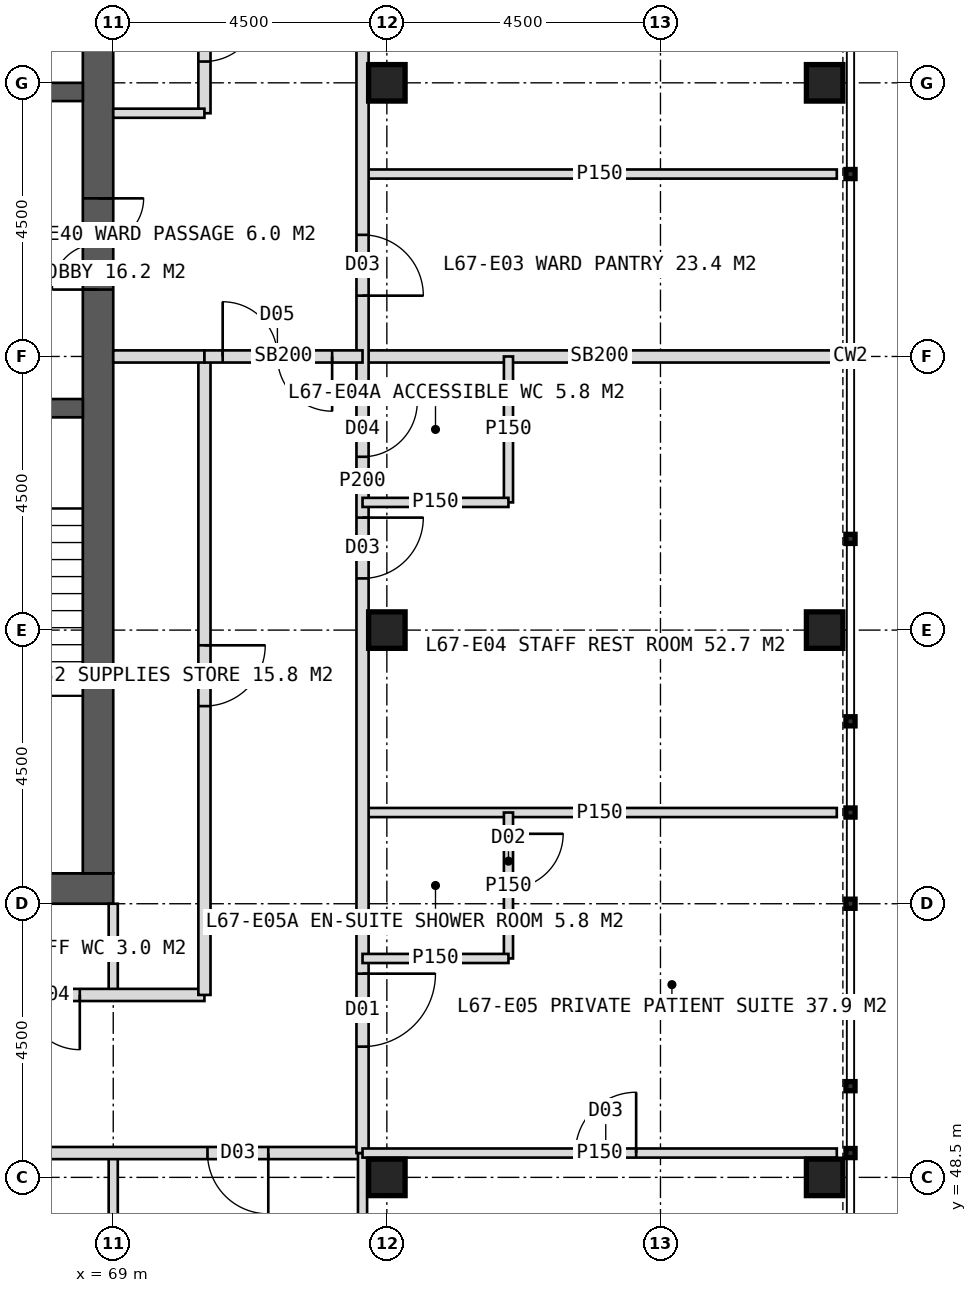
"""IFC4 building model, lengths in metres.
Left out: names, types, materials, properties, quantities, classifications, styles, units other than length and angle.
Written with IfcOpenShell. Run it as: python <this file> out.ifc"""

import sys

from ifc_helpers import new_model, si_unit, direction, frame, frame_2d, origin, origin_2d, place, context, subcontext, project, spatial, rectangle, hollow_rectangle, extrude, element, fill, save


model = new_model("IFC4")
c1 = context("Model", 3, precision=1e-05, world=origin(), true_north=direction((0.0, 1.0)))
c2 = subcontext(c1, "Body", "Model", "MODEL_VIEW")
j1 = project(units=[si_unit("LENGTHUNIT", "METRE"), si_unit("PLANEANGLEUNIT", "RADIAN")], contexts=[c1])
p1 = place(None, origin())
s1 = spatial("IfcSite", under=j1, at=p1, CompositionType="ELEMENT")
p2 = place(p1, origin())
s2 = spatial("IfcBuilding", under=s1, at=p2, CompositionType="ELEMENT")
p3 = place(p2, frame((0.0, 0.0, 278.0)))
s3 = spatial("IfcBuildingStorey", under=s2, at=p3, CompositionType="ELEMENT", Elevation=278.0)
p4 = place(p3, frame((51.0, 53.25, 0.0), z_axis=(0.0, 0.0, 1.0), x_axis=(1.0, 0.0, 0.0)))
e1 = element("IfcWall", 1, at=p4, inside=s3, PredefinedType="SHEAR", context=c2, shape_type="SweptSolid", body=[
    extrude(rectangle(XDim=18.0, YDim=0.5, at=frame_2d((9.0, 0.0))), origin(), (0.0, 0.0, 1.0), 4.0),
])
p5 = place(p4, frame((8.1, 0.0, 0.0)))
e2 = element("IfcOpeningElement", 2, at=p5, cuts=e1, PredefinedType="OPENING", context=c2, shape_type="SweptSolid", body=[
    extrude(rectangle(XDim=1.8, YDim=2.2, at=frame_2d((0.9, 1.1))), frame((0.0, 0.26, 0.0), z_axis=(0.0, -1.0, 0.0), x_axis=(1.0, 0.0, 0.0)), (0.0, 0.0, 1.0), 0.52),
])
p6 = place(p3, frame((68.75, 53.5, 0.0), z_axis=(0.0, 0.0, 1.0), x_axis=(0.0, 1.0, 0.0)))
e3 = element("IfcWall", 3, at=p6, inside=s3, PredefinedType="SHEAR", context=c2, shape_type="SweptSolid", body=[
    extrude(rectangle(XDim=17.0, YDim=0.5, at=frame_2d((8.5, 0.0))), origin(), (0.0, 0.0, 1.0), 4.0),
])
p7 = place(p6, frame((9.6, 0.0, 0.0)))
e4 = element("IfcOpeningElement", 4, at=p7, cuts=e3, PredefinedType="OPENING", context=c2, shape_type="SweptSolid", body=[
    extrude(rectangle(XDim=1.5, YDim=2.2, at=frame_2d((0.75, 1.1))), frame((0.0, 0.26, 0.0), z_axis=(0.0, -1.0, 0.0), x_axis=(1.0, 0.0, 0.0)), (0.0, 0.0, 1.0), 0.52),
])
p8 = place(p3, frame((65.2, 61.15, 0.0), z_axis=(0.0, 0.0, 1.0), x_axis=(1.0, 0.0, 0.0)))
e5 = element("IfcWall", 5, at=p8, inside=s3, PredefinedType="SHEAR", context=c2, shape_type="SweptSolid", body=[
    extrude(rectangle(XDim=3.3, YDim=0.3, at=frame_2d((1.65, 0.0))), origin(), (0.0, 0.0, 1.0), 4.0),
])
p9 = place(p8, frame((1.05, 0.0, 0.0)))
e6 = element("IfcOpeningElement", 6, at=p9, cuts=e5, PredefinedType="OPENING", context=c2, shape_type="SweptSolid", body=[
    extrude(rectangle(XDim=1.2, YDim=2.1, at=frame_2d((0.6, 1.05))), frame((0.0, 0.16, 0.0), z_axis=(0.0, -1.0, 0.0), x_axis=(1.0, 0.0, 0.0)), (0.0, 0.0, 1.0), 0.32),
])
p10 = place(p3, frame((65.2, 66.35, 0.0), z_axis=(0.0, 0.0, 1.0), x_axis=(1.0, 0.0, 0.0)))
e7 = element("IfcWall", 7, at=p10, inside=s3, PredefinedType="SHEAR", context=c2, shape_type="SweptSolid", body=[
    extrude(rectangle(XDim=3.3, YDim=0.3, at=frame_2d((1.65, 0.0))), origin(), (0.0, 0.0, 1.0), 4.0),
])
p11 = place(p10, frame((1.05, 0.0, 0.0)))
e8 = element("IfcOpeningElement", 8, at=p11, cuts=e7, PredefinedType="OPENING", context=c2, shape_type="SweptSolid", body=[
    extrude(rectangle(XDim=1.2, YDim=2.2, at=frame_2d((0.6, 1.1))), frame((0.0, 0.16, 0.0), z_axis=(0.0, -1.0, 0.0), x_axis=(1.0, 0.0, 0.0)), (0.0, 0.0, 1.0), 0.32),
])
for number, where, z_axis, x_axis in (
    (9, (73.5, 48.5, 0.0), (0.0, 0.0, 1.0), (1.0, 0.0, 0.0)),
    (10, (73.5, 57.5, 0.0), (0.0, 0.0, 1.0), (1.0, 0.0, 0.0)),
    (11, (73.5, 66.5, 0.0), (0.0, 0.0, 1.0), (1.0, 0.0, 0.0)),
    (12, (80.7, 48.5, 0.0), (0.0, 0.0, 1.0), (1.0, 0.0, 0.0)),
    (13, (80.7, 57.5, 0.0), (0.0, 0.0, 1.0), (1.0, 0.0, 0.0)),
    (14, (80.7, 66.5, 0.0), (0.0, 0.0, 1.0), (1.0, 0.0, 0.0)),
):
    element("IfcColumn", number, at=place(p3, frame(where, z_axis=z_axis, x_axis=x_axis)), inside=s3, PredefinedType="COLUMN", context=c2, shape_type="SweptSolid", body=[
        extrude(hollow_rectangle(XDim=0.6, YDim=0.6, WallThickness=0.04, at=origin_2d()), origin(), (0.0, 0.0, 1.0), 4.0),
    ])
p12 = place(p3, frame((69.0, 48.9, 0.0), z_axis=(0.0, 0.0, 1.0), x_axis=(0.0, -1.0, 0.0)))
e15 = element("IfcWall", 15, at=p12, inside=s3, PredefinedType="PARTITIONING", context=c2, shape_type="SweptSolid", body=[
    extrude(rectangle(XDim=7.8, YDim=0.15, at=frame_2d((3.9, 0.0))), origin(), (0.0, 0.0, 1.0), 3.75),
])
p13 = place(p3, frame((73.1, 48.9, 0.0), z_axis=(0.0, 0.0, 1.0), x_axis=(-1.0, 0.0, 0.0)))
e16 = element("IfcWall", 16, at=p13, inside=s3, PredefinedType="PARTITIONING", context=c2, shape_type="SweptSolid", body=[
    extrude(rectangle(XDim=26.2, YDim=0.2, at=frame_2d((13.1, 0.0))), origin(), (0.0, 0.0, 1.0), 3.75),
])
p14 = place(p13, frame((1.55, 0.0, 0.0)))
e17 = element("IfcOpeningElement", 17, at=p14, cuts=e16, PredefinedType="OPENING", context=c2, shape_type="SweptSolid", body=[
    extrude(rectangle(XDim=1.0, YDim=2.1, at=frame_2d((0.5, 1.05))), frame((0.0, 0.11, 0.0), z_axis=(0.0, -1.0, 0.0), x_axis=(1.0, 0.0, 0.0)), (0.0, 0.0, 1.0), 0.22),
])
p15 = place(p13, frame((6.75, 0.0, 0.0)))
e18 = element("IfcOpeningElement", 18, at=p15, cuts=e16, PredefinedType="OPENING", context=c2, shape_type="SweptSolid", body=[
    extrude(rectangle(XDim=1.0, YDim=2.1, at=frame_2d((0.5, 1.05))), frame((0.0, 0.11, 0.0), z_axis=(0.0, -1.0, 0.0), x_axis=(1.0, 0.0, 0.0)), (0.0, 0.0, 1.0), 0.22),
])
p16 = place(p13, frame((14.25, 0.0, 0.0)))
e19 = element("IfcOpeningElement", 19, at=p16, cuts=e16, PredefinedType="OPENING", context=c2, shape_type="SweptSolid", body=[
    extrude(rectangle(XDim=1.2, YDim=2.2, at=frame_2d((0.6, 1.1))), frame((0.0, 0.11, 0.0), z_axis=(0.0, -1.0, 0.0), x_axis=(1.0, 0.0, 0.0)), (0.0, 0.0, 1.0), 0.22),
])
p17 = place(p13, frame((18.45, 0.0, 0.0)))
e20 = element("IfcOpeningElement", 20, at=p17, cuts=e16, PredefinedType="OPENING", context=c2, shape_type="SweptSolid", body=[
    extrude(rectangle(XDim=1.0, YDim=2.1, at=frame_2d((0.5, 1.05))), frame((0.0, 0.11, 0.0), z_axis=(0.0, -1.0, 0.0), x_axis=(1.0, 0.0, 0.0)), (0.0, 0.0, 1.0), 0.22),
])
p18 = place(p13, frame((23.25, 0.0, 0.0)))
e21 = element("IfcOpeningElement", 21, at=p18, cuts=e16, PredefinedType="OPENING", context=c2, shape_type="SweptSolid", body=[
    extrude(rectangle(XDim=1.2, YDim=2.2, at=frame_2d((0.6, 1.1))), frame((0.0, 0.11, 0.0), z_axis=(0.0, -1.0, 0.0), x_axis=(1.0, 0.0, 0.0)), (0.0, 0.0, 1.0), 0.22),
])
p19 = place(p3, frame((73.1, 48.9, 0.0), z_axis=(0.0, 0.0, 1.0), x_axis=(0.0, -1.0, 0.0)))
e22 = element("IfcWall", 22, at=p19, inside=s3, PredefinedType="PARTITIONING", context=c2, shape_type="SweptSolid", body=[
    extrude(rectangle(XDim=7.8, YDim=0.15, at=frame_2d((3.9, 0.0))), origin(), (0.0, 0.0, 1.0), 3.75),
])
p20 = place(p3, frame((69.0, 53.0, 0.0), z_axis=(0.0, 0.0, 1.0), x_axis=(0.0, -1.0, 0.0)))
e23 = element("IfcWall", 23, at=p20, inside=s3, PredefinedType="PARTITIONING", context=c2, shape_type="SweptSolid", body=[
    extrude(rectangle(XDim=1.5, YDim=0.15, at=frame_2d((0.75, 0.0))), origin(), (0.0, 0.0, 1.0), 3.75),
])
p21 = place(p3, frame((70.5, 51.5, 0.0), z_axis=(0.0, 0.0, 1.0), x_axis=(-1.0, 0.0, 0.0)))
e24 = element("IfcWall", 24, at=p21, inside=s3, PredefinedType="PARTITIONING", context=c2, shape_type="SweptSolid", body=[
    extrude(rectangle(XDim=8.25, YDim=0.2, at=frame_2d((4.125, 0.0))), origin(), (0.0, 0.0, 1.0), 3.75),
])
p22 = place(p21, frame((2.05, 0.0, 0.0)))
e25 = element("IfcOpeningElement", 25, at=p22, cuts=e24, PredefinedType="OPENING", context=c2, shape_type="SweptSolid", body=[
    extrude(rectangle(XDim=0.9, YDim=2.1, at=frame_2d((0.45, 1.05))), frame((0.0, 0.11, 0.0), z_axis=(0.0, -1.0, 0.0), x_axis=(1.0, 0.0, 0.0)), (0.0, 0.0, 1.0), 0.22),
])
p23 = place(p21, frame((5.375, 0.0, 0.0)))
e26 = element("IfcOpeningElement", 26, at=p23, cuts=e24, PredefinedType="OPENING", context=c2, shape_type="SweptSolid", body=[
    extrude(rectangle(XDim=1.0, YDim=2.1, at=frame_2d((0.5, 1.05))), frame((0.0, 0.11, 0.0), z_axis=(0.0, -1.0, 0.0), x_axis=(1.0, 0.0, 0.0)), (0.0, 0.0, 1.0), 0.22),
])
p24 = place(p3, frame((73.1, 65.0, 0.0), z_axis=(0.0, 0.0, 1.0), x_axis=(1.0, 0.0, 0.0)))
e27 = element("IfcWall", 27, at=p24, inside=s3, PredefinedType="PARTITIONING", context=c2, shape_type="SweptSolid", body=[
    extrude(rectangle(XDim=7.8, YDim=0.15, at=frame_2d((3.9, 0.0))), origin(), (0.0, 0.0, 1.0), 3.75),
])
p25 = place(p3, frame((73.1, 62.0, 0.0), z_axis=(0.0, 0.0, 1.0), x_axis=(1.0, 0.0, 0.0)))
e28 = element("IfcWall", 28, at=p25, inside=s3, PredefinedType="SOLIDWALL", context=c2, shape_type="SweptSolid", body=[
    extrude(rectangle(XDim=7.8, YDim=0.2, at=frame_2d((3.9, 0.0))), origin(), (0.0, 0.0, 1.0), 2.75),
])
p26 = place(p3, frame((73.1, 54.5, 0.0), z_axis=(0.0, 0.0, 1.0), x_axis=(1.0, 0.0, 0.0)))
e29 = element("IfcWall", 29, at=p26, inside=s3, PredefinedType="PARTITIONING", context=c2, shape_type="SweptSolid", body=[
    extrude(rectangle(XDim=7.8, YDim=0.15, at=frame_2d((3.9, 0.0))), origin(), (0.0, 0.0, 1.0), 3.75),
])
p27 = place(p3, frame((73.1, 71.0, 0.0), z_axis=(0.0, 0.0, 1.0), x_axis=(0.0, -1.0, 0.0)))
e30 = element("IfcWall", 30, at=p27, inside=s3, PredefinedType="PARTITIONING", context=c2, shape_type="SweptSolid", body=[
    extrude(rectangle(XDim=22.1, YDim=0.2, at=frame_2d((11.05, 0.0))), origin(), (0.0, 0.0, 1.0), 3.75),
])
p28 = place(p27, frame((2.5, 0.0, 0.0)))
e31 = element("IfcOpeningElement", 31, at=p28, cuts=e30, PredefinedType="OPENING", context=c2, shape_type="SweptSolid", body=[
    extrude(rectangle(XDim=1.0, YDim=2.1, at=frame_2d((0.5, 1.05))), frame((0.0, 0.11, 0.0), z_axis=(0.0, -1.0, 0.0), x_axis=(1.0, 0.0, 0.0)), (0.0, 0.0, 1.0), 0.22),
])
p29 = place(p27, frame((7.0, 0.0, 0.0)))
e32 = element("IfcOpeningElement", 32, at=p29, cuts=e30, PredefinedType="OPENING", context=c2, shape_type="SweptSolid", body=[
    extrude(rectangle(XDim=1.0, YDim=2.1, at=frame_2d((0.5, 1.05))), frame((0.0, 0.11, 0.0), z_axis=(0.0, -1.0, 0.0), x_axis=(1.0, 0.0, 0.0)), (0.0, 0.0, 1.0), 0.22),
])
p30 = place(p27, frame((9.75, 0.0, 0.0)))
e33 = element("IfcOpeningElement", 33, at=p30, cuts=e30, PredefinedType="OPENING", context=c2, shape_type="SweptSolid", body=[
    extrude(rectangle(XDim=0.9, YDim=2.1, at=frame_2d((0.45, 1.05))), frame((0.0, 0.11, 0.0), z_axis=(0.0, -1.0, 0.0), x_axis=(1.0, 0.0, 0.0)), (0.0, 0.0, 1.0), 0.22),
])
p31 = place(p27, frame((11.65, 0.0, 0.0)))
e34 = element("IfcOpeningElement", 34, at=p31, cuts=e30, PredefinedType="OPENING", context=c2, shape_type="SweptSolid", body=[
    extrude(rectangle(XDim=1.0, YDim=2.1, at=frame_2d((0.5, 1.05))), frame((0.0, 0.11, 0.0), z_axis=(0.0, -1.0, 0.0), x_axis=(1.0, 0.0, 0.0)), (0.0, 0.0, 1.0), 0.22),
])
p32 = place(p27, frame((19.15, 0.0, 0.0)))
e35 = element("IfcOpeningElement", 35, at=p32, cuts=e30, PredefinedType="OPENING", context=c2, shape_type="SweptSolid", body=[
    extrude(rectangle(XDim=1.2, YDim=2.2, at=frame_2d((0.6, 1.1))), frame((0.0, 0.11, 0.0), z_axis=(0.0, -1.0, 0.0), x_axis=(1.0, 0.0, 0.0)), (0.0, 0.0, 1.0), 0.22),
])
for number, where, z_axis, x_axis in (
    (36, (75.5, 62.0, 0.0), (0.0, 0.0, 1.0), (0.0, -1.0, 0.0)),
    (37, (73.1, 59.6, 0.0), (0.0, 0.0, 1.0), (1.0, 0.0, 0.0)),
):
    element("IfcWall", number, at=place(p3, frame(where, z_axis=z_axis, x_axis=x_axis)), inside=s3, PredefinedType="PARTITIONING", context=c2, shape_type="SweptSolid", body=[
        extrude(rectangle(XDim=2.4, YDim=0.15, at=frame_2d((1.2, 0.0))), origin(), (0.0, 0.0, 1.0), 3.75),
    ])
p33 = place(p3, frame((73.1, 48.9, 0.0), z_axis=(0.0, 0.0, 1.0), x_axis=(1.0, 0.0, 0.0)))
e38 = element("IfcWall", 38, at=p33, inside=s3, PredefinedType="PARTITIONING", context=c2, shape_type="SweptSolid", body=[
    extrude(rectangle(XDim=7.8, YDim=0.15, at=frame_2d((3.9, 0.0))), origin(), (0.0, 0.0, 1.0), 3.75),
])
p34 = place(p33, frame((3.5, 0.0, 0.0)))
e39 = element("IfcOpeningElement", 39, at=p34, cuts=e38, PredefinedType="OPENING", context=c2, shape_type="SweptSolid", body=[
    extrude(rectangle(XDim=1.0, YDim=2.1, at=frame_2d((0.5, 1.05))), frame((0.0, 0.085, 0.0), z_axis=(0.0, -1.0, 0.0), x_axis=(1.0, 0.0, 0.0)), (0.0, 0.0, 1.0), 0.17),
])
p35 = place(p3, frame((75.5, 54.5, 0.0), z_axis=(0.0, 0.0, 1.0), x_axis=(0.0, -1.0, 0.0)))
e40 = element("IfcWall", 40, at=p35, inside=s3, PredefinedType="PARTITIONING", context=c2, shape_type="SweptSolid", body=[
    extrude(rectangle(XDim=2.4, YDim=0.15, at=frame_2d((1.2, 0.0))), origin(), (0.0, 0.0, 1.0), 3.75),
])
p36 = place(p35, frame((0.35, 0.0, 0.0)))
e41 = element("IfcOpeningElement", 41, at=p36, cuts=e40, PredefinedType="OPENING", context=c2, shape_type="SweptSolid", body=[
    extrude(rectangle(XDim=0.9, YDim=2.1, at=frame_2d((0.45, 1.05))), frame((0.0, 0.085, 0.0), z_axis=(0.0, -1.0, 0.0), x_axis=(1.0, 0.0, 0.0)), (0.0, 0.0, 1.0), 0.17),
])
p37 = place(p3, frame((73.1, 52.1, 0.0), z_axis=(0.0, 0.0, 1.0), x_axis=(1.0, 0.0, 0.0)))
e42 = element("IfcWall", 42, at=p37, inside=s3, PredefinedType="PARTITIONING", context=c2, shape_type="SweptSolid", body=[
    extrude(rectangle(XDim=2.4, YDim=0.15, at=frame_2d((1.2, 0.0))), origin(), (0.0, 0.0, 1.0), 3.75),
])
p38 = place(p3, frame((70.5, 71.0, 0.0), z_axis=(0.0, 0.0, 1.0), x_axis=(0.0, -1.0, 0.0)))
e43 = element("IfcWall", 43, at=p38, inside=s3, PredefinedType="PARTITIONING", context=c2, shape_type="SweptSolid", body=[
    extrude(rectangle(XDim=5.0, YDim=0.2, at=frame_2d((2.5, 0.0))), origin(), (0.0, 0.0, 1.0), 3.75),
])
p39 = place(p38, frame((0.75, 0.0, 0.0)))
e44 = element("IfcOpeningElement", 44, at=p39, cuts=e43, PredefinedType="OPENING", context=c2, shape_type="SweptSolid", body=[
    extrude(rectangle(XDim=0.9, YDim=2.1, at=frame_2d((0.45, 1.05))), frame((0.0, 0.11, 0.0), z_axis=(0.0, -1.0, 0.0), x_axis=(1.0, 0.0, 0.0)), (0.0, 0.0, 1.0), 0.22),
])
p40 = place(p38, frame((3.25, 0.0, 0.0)))
e45 = element("IfcOpeningElement", 45, at=p40, cuts=e43, PredefinedType="OPENING", context=c2, shape_type="SweptSolid", body=[
    extrude(rectangle(XDim=0.9, YDim=2.1, at=frame_2d((0.45, 1.05))), frame((0.0, 0.11, 0.0), z_axis=(0.0, -1.0, 0.0), x_axis=(1.0, 0.0, 0.0)), (0.0, 0.0, 1.0), 0.22),
])
p41 = place(p3, frame((70.5, 62.0, 0.0), z_axis=(0.0, 0.0, 1.0), x_axis=(0.0, -1.0, 0.0)))
e46 = element("IfcWall", 46, at=p41, inside=s3, PredefinedType="PARTITIONING", context=c2, shape_type="SweptSolid", body=[
    extrude(rectangle(XDim=10.5, YDim=0.2, at=frame_2d((5.25, 0.0))), origin(), (0.0, 0.0, 1.0), 3.75),
])
p42 = place(p41, frame((4.75, 0.0, 0.0)))
e47 = element("IfcOpeningElement", 47, at=p42, cuts=e46, PredefinedType="OPENING", context=c2, shape_type="SweptSolid", body=[
    extrude(rectangle(XDim=1.0, YDim=2.1, at=frame_2d((0.5, 1.05))), frame((0.0, 0.11, 0.0), z_axis=(0.0, -1.0, 0.0), x_axis=(1.0, 0.0, 0.0)), (0.0, 0.0, 1.0), 0.22),
])
p43 = place(p3, frame((69.0, 66.0, 0.0), z_axis=(0.0, 0.0, 1.0), x_axis=(1.0, 0.0, 0.0)))
e48 = element("IfcWall", 48, at=p43, inside=s3, PredefinedType="PARTITIONING", context=c2, shape_type="SweptSolid", body=[
    extrude(rectangle(XDim=1.5, YDim=0.15, at=frame_2d((0.75, 0.0))), origin(), (0.0, 0.0, 1.0), 3.75),
])
p44 = place(p3, frame((69.0, 62.0, 0.0), z_axis=(0.0, 0.0, 1.0), x_axis=(1.0, 0.0, 0.0)))
e49 = element("IfcWall", 49, at=p44, inside=s3, PredefinedType="SOLIDWALL", context=c2, shape_type="SweptSolid", body=[
    extrude(rectangle(XDim=1.5, YDim=0.2, at=frame_2d((0.75, 0.0))), origin(), (0.0, 0.0, 1.0), 2.75),
])
p45 = place(p3, frame((70.5, 62.0, 0.0), z_axis=(0.0, 0.0, 1.0), x_axis=(1.0, 0.0, 0.0)))
e50 = element("IfcWall", 50, at=p45, inside=s3, PredefinedType="SOLIDWALL", context=c2, shape_type="SweptSolid", body=[
    extrude(rectangle(XDim=2.6, YDim=0.2, at=frame_2d((1.3, 0.0))), origin(), (0.0, 0.0, 1.0), 2.75),
])
p46 = place(p45, frame((0.3, 0.0, 0.0)))
e51 = element("IfcOpeningElement", 51, at=p46, cuts=e50, PredefinedType="OPENING", context=c2, shape_type="SweptSolid", body=[
    extrude(rectangle(XDim=1.8, YDim=2.2, at=frame_2d((0.9, 1.1))), frame((0.0, 0.11, 0.0), z_axis=(0.0, -1.0, 0.0), x_axis=(1.0, 0.0, 0.0)), (0.0, 0.0, 1.0), 0.22),
])
p47 = place(p14, origin())
e52 = element("IfcDoor", 52, at=p47, inside=s3, OperationType="SINGLE_SWING_LEFT", PredefinedType="DOOR", context=c2, shape_type="SweptSolid", body=[
    extrude(rectangle(XDim=1.0, YDim=2.1, at=frame_2d((0.5, 1.05))), frame((0.0, 0.025, 0.0), z_axis=(0.0, -1.0, 0.0), x_axis=(1.0, 0.0, 0.0)), (0.0, 0.0, 1.0), 0.05),
])
fill(e17, e52)
p48 = place(p22, origin())
e53 = element("IfcDoor", 53, at=p48, inside=s3, OperationType="SINGLE_SWING_LEFT", PredefinedType="DOOR", context=c2, shape_type="SweptSolid", body=[
    extrude(rectangle(XDim=0.9, YDim=2.1, at=frame_2d((0.45, 1.05))), frame((0.0, 0.025, 0.0), z_axis=(0.0, -1.0, 0.0), x_axis=(1.0, 0.0, 0.0)), (0.0, 0.0, 1.0), 0.05),
])
fill(e25, e53)
p49 = place(p29, origin())
e54 = element("IfcDoor", 54, at=p49, inside=s3, OperationType="SINGLE_SWING_RIGHT", PredefinedType="DOOR", context=c2, shape_type="SweptSolid", body=[
    extrude(rectangle(XDim=1.0, YDim=2.1, at=frame_2d((0.5, 1.05))), frame((0.0, 0.025, 0.0), z_axis=(0.0, -1.0, 0.0), x_axis=(1.0, 0.0, 0.0)), (0.0, 0.0, 1.0), 0.05),
])
fill(e32, e54)
p50 = place(p30, origin())
e55 = element("IfcDoor", 55, at=p50, inside=s3, OperationType="SINGLE_SWING_LEFT", PredefinedType="DOOR", context=c2, shape_type="SweptSolid", body=[
    extrude(rectangle(XDim=0.9, YDim=2.1, at=frame_2d((0.45, 1.05))), frame((0.0, 0.025, 0.0), z_axis=(0.0, -1.0, 0.0), x_axis=(1.0, 0.0, 0.0)), (0.0, 0.0, 1.0), 0.05),
])
fill(e33, e55)
p51 = place(p31, origin())
e56 = element("IfcDoor", 56, at=p51, inside=s3, OperationType="SINGLE_SWING_LEFT", PredefinedType="DOOR", context=c2, shape_type="SweptSolid", body=[
    extrude(rectangle(XDim=1.0, YDim=2.1, at=frame_2d((0.5, 1.05))), frame((0.0, 0.025, 0.0), z_axis=(0.0, -1.0, 0.0), x_axis=(1.0, 0.0, 0.0)), (0.0, 0.0, 1.0), 0.05),
])
fill(e34, e56)
p52 = place(p34, origin())
e57 = element("IfcDoor", 57, at=p52, inside=s3, OperationType="SINGLE_SWING_RIGHT", PredefinedType="DOOR", context=c2, shape_type="SweptSolid", body=[
    extrude(rectangle(XDim=1.0, YDim=2.1, at=frame_2d((0.5, 1.05))), frame((0.0, 0.025, 0.0), z_axis=(0.0, -1.0, 0.0), x_axis=(1.0, 0.0, 0.0)), (0.0, 0.0, 1.0), 0.05),
])
fill(e39, e57)
p53 = place(p32, origin())
e58 = element("IfcDoor", 58, at=p53, inside=s3, OperationType="SINGLE_SWING_LEFT", PredefinedType="DOOR", context=c2, shape_type="SweptSolid", body=[
    extrude(rectangle(XDim=1.2, YDim=2.2, at=frame_2d((0.6, 1.1))), frame((0.0, 0.025, 0.0), z_axis=(0.0, -1.0, 0.0), x_axis=(1.0, 0.0, 0.0)), (0.0, 0.0, 1.0), 0.05),
])
fill(e35, e58)
p54 = place(p36, origin())
e59 = element("IfcDoor", 59, at=p54, inside=s3, OperationType="SINGLE_SWING_LEFT", PredefinedType="DOOR", context=c2, shape_type="SweptSolid", body=[
    extrude(rectangle(XDim=0.9, YDim=2.1, at=frame_2d((0.45, 1.05))), frame((0.0, 0.025, 0.0), z_axis=(0.0, -1.0, 0.0), x_axis=(1.0, 0.0, 0.0)), (0.0, 0.0, 1.0), 0.05),
])
fill(e41, e59)
p55 = place(p40, origin())
e60 = element("IfcDoor", 60, at=p55, inside=s3, OperationType="SINGLE_SWING_LEFT", PredefinedType="DOOR", context=c2, shape_type="SweptSolid", body=[
    extrude(rectangle(XDim=0.9, YDim=2.1, at=frame_2d((0.45, 1.05))), frame((0.0, 0.025, 0.0), z_axis=(0.0, -1.0, 0.0), x_axis=(1.0, 0.0, 0.0)), (0.0, 0.0, 1.0), 0.05),
])
fill(e45, e60)
p56 = place(p42, origin())
e61 = element("IfcDoor", 61, at=p56, inside=s3, OperationType="SINGLE_SWING_LEFT", PredefinedType="DOOR", context=c2, shape_type="SweptSolid", body=[
    extrude(rectangle(XDim=1.0, YDim=2.1, at=frame_2d((0.5, 1.05))), frame((0.0, 0.025, 0.0), z_axis=(0.0, -1.0, 0.0), x_axis=(1.0, 0.0, 0.0)), (0.0, 0.0, 1.0), 0.05),
])
fill(e47, e61)
p57 = place(p46, origin())
e62 = element("IfcDoor", 62, at=p57, inside=s3, OperationType="DOUBLE_DOOR_DOUBLE_SWING", PredefinedType="DOOR", context=c2, shape_type="SweptSolid", body=[
    extrude(rectangle(XDim=1.8, YDim=2.2, at=frame_2d((0.9, 1.1))), frame((0.0, 0.025, 0.0), z_axis=(0.0, -1.0, 0.0), x_axis=(1.0, 0.0, 0.0)), (0.0, 0.0, 1.0), 0.05),
])
fill(e51, e62)
p58 = place(p7, origin())
e63 = element("IfcDoor", 63, at=p58, inside=s3, OperationType="DOUBLE_DOOR_SINGLE_SWING", PredefinedType="DOOR", context=c2, shape_type="SweptSolid", body=[
    extrude(rectangle(XDim=1.5, YDim=2.2, at=frame_2d((0.75, 1.1))), frame((0.0, 0.025, 0.0), z_axis=(0.0, -1.0, 0.0), x_axis=(1.0, 0.0, 0.0)), (0.0, 0.0, 1.0), 0.05),
])
fill(e4, e63)
save(model, sys.argv[1])
